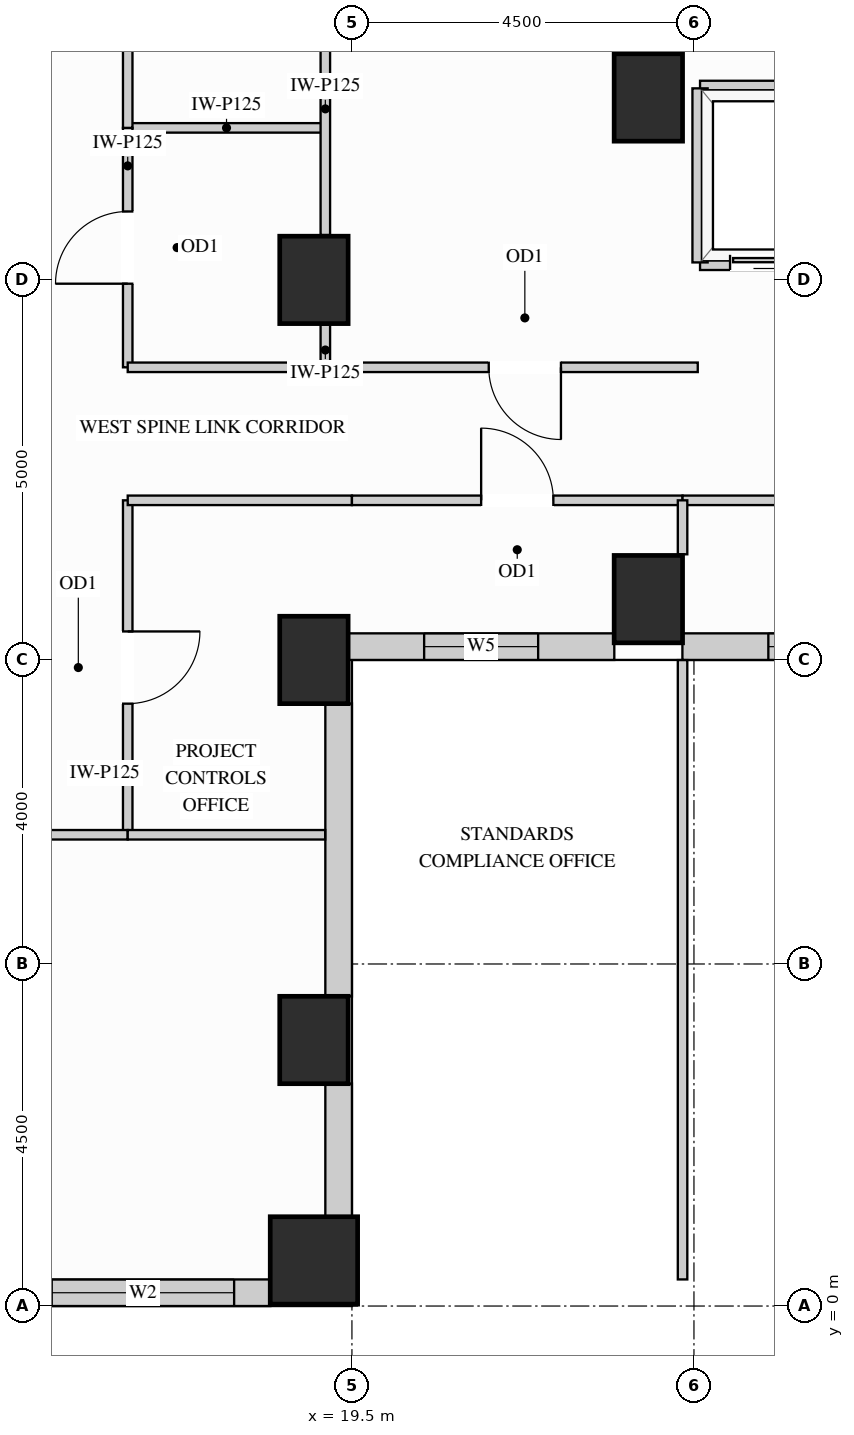
"""IFC4 building model, lengths in metres.
Left out: names, types, materials, properties, quantities, classifications, styles, units other than length and angle.
Written with IfcOpenShell. Run it as: python <this file> out.ifc"""

import sys

from ifc_helpers import new_model, si_unit, direction, frame, frame_2d, origin, origin_2d, place, context, subcontext, project, spatial, rectangle, extrude, source, transform, mapped, element, fill, save


model = new_model("IFC4")
c1 = context("Model", 3, precision=1e-05, world=origin(), true_north=direction((0.0, 1.0)))
c2 = subcontext(c1, "Body", "Model", "MODEL_VIEW")
j1 = project(units=[si_unit("LENGTHUNIT", "METRE"), si_unit("PLANEANGLEUNIT", "RADIAN")], contexts=[c1])
p1 = place(None, origin())
s1 = spatial("IfcSite", under=j1, at=p1, CompositionType="ELEMENT")
p2 = place(p1, origin())
s2 = spatial("IfcBuilding", under=s1, at=p2, CompositionType="ELEMENT")
p3 = place(p2, frame((0.0, 0.0, 135.0)))
s3 = spatial("IfcBuildingStorey", under=s2, at=p3, CompositionType="ELEMENT", Elevation=135.0)
m1 = source(origin(), c2, "Body", "SweptSolid", [
    extrude(rectangle(XDim=0.9, YDim=1.15, at=origin_2d()), origin(), (0.0, 0.0, 1.0), 3.32),
])
for number, where, z_axis, x_axis in (
    (1, (19.0, 13.5, 0.0), (0.0, 0.0, 1.0), (1.0, 0.0, 0.0)),
    (2, (19.0, 3.5, 0.0), (0.0, 0.0, 1.0), (1.0, 0.0, 0.0)),
    (3, (19.0, 8.5, 0.0), (0.0, 0.0, 1.0), (1.0, 0.0, 0.0)),
    (4, (23.4, 15.9, 0.0), (0.0, 0.0, 1.0), (1.0, 0.0, 0.0)),
    (5, (23.4, 9.3, 0.0), (0.0, 0.0, 1.0), (1.0, 0.0, 0.0)),
):
    element("IfcColumn", number, at=place(p3, frame(where, z_axis=z_axis, x_axis=x_axis)), inside=s3, PredefinedType="COLUMN", context=c2, shape_type="MappedRepresentation", body=[
        mapped(m1, transform((0.0, 0.0, 0.0), x_axis=(1.0, 0.0, 0.0), y_axis=(0.0, 1.0, 0.0), z_axis=(0.0, 0.0, 1.0))),
    ])
m2 = source(origin(), c2, "Body", "SweptSolid", [
    extrude(rectangle(XDim=1.15, YDim=1.15, at=origin_2d()), origin(), (0.0, 0.0, 1.0), 3.32),
])
p4 = place(p3, frame((19.0, 0.6, 0.0), z_axis=(0.0, 0.0, 1.0), x_axis=(1.0, 0.0, 0.0)))
e6 = element("IfcColumn", 6, at=p4, inside=s3, PredefinedType="COLUMN", context=c2, shape_type="MappedRepresentation", body=[
    mapped(m2, transform((0.0, 0.0, 0.0), x_axis=(1.0, 0.0, 0.0), y_axis=(0.0, 1.0, 0.0), z_axis=(0.0, 0.0, 1.0))),
])
p5 = place(p3, frame((15.073, 0.175, 0.0), z_axis=(0.0, 0.0, 1.0), x_axis=(1.0, 0.0, 0.0)))
e7 = element("IfcWall", 7, at=p5, inside=s3, PredefinedType="SOLIDWALL", context=c2, shape_type="SweptSolid", body=[
    extrude(rectangle(XDim=3.354, YDim=0.35, at=frame_2d((1.677, 0.0))), origin(), (0.0, 0.0, 1.0), 3.305),
])
p6 = place(p5, frame((0.477, 0.0, 0.78)))
e8 = element("IfcOpeningElement", 8, at=p6, cuts=e7, PredefinedType="OPENING", context=c2, shape_type="SweptSolid", body=[
    extrude(rectangle(XDim=2.4, YDim=2.1, at=frame_2d((1.2, 1.05))), frame((0.0, 0.185, 0.0), z_axis=(0.0, -1.0, 0.0), x_axis=(1.0, 0.0, 0.0)), (0.0, 0.0, 1.0), 0.37),
])
m3 = source(origin(), c2, "Body", "SweptSolid", [
    extrude(rectangle(XDim=1.754, YDim=0.35, at=frame_2d((0.877, 0.0))), origin(), (0.0, 0.0, 1.0), 2.459),
])
p7 = place(p3, frame((19.325, 1.173, 0.0), z_axis=(0.0, 0.0, 1.0), x_axis=(0.0, 1.0, 0.0)))
e9 = element("IfcWall", 9, at=p7, inside=s3, PredefinedType="SOLIDWALL", context=c2, shape_type="MappedRepresentation", body=[
    mapped(m3, transform((0.0, 0.0, 0.0), x_axis=(1.0, 0.0, 0.0), y_axis=(0.0, 1.0, 0.0), z_axis=(0.0, 0.0, 1.0))),
])
m4 = source(origin(), c2, "Body", "SweptSolid", [
    extrude(rectangle(XDim=3.854, YDim=0.35, at=frame_2d((1.927, 0.0))), origin(), (0.0, 0.0, 1.0), 2.459),
])
p8 = place(p3, frame((19.325, 4.073, 0.0), z_axis=(0.0, 0.0, 1.0), x_axis=(0.0, 1.0, 0.0)))
e10 = element("IfcWall", 10, at=p8, inside=s3, PredefinedType="SOLIDWALL", context=c2, shape_type="MappedRepresentation", body=[
    mapped(m4, transform((0.0, 0.0, 0.0), x_axis=(1.0, 0.0, 0.0), y_axis=(0.0, 1.0, 0.0), z_axis=(0.0, 0.0, 1.0))),
])
p9 = place(p3, frame((19.448, 8.675, 0.0), z_axis=(0.0, 0.0, 1.0), x_axis=(1.0, 0.0, 0.0)))
e11 = element("IfcWall", 11, at=p9, inside=s3, PredefinedType="SOLIDWALL", context=c2, shape_type="SweptSolid", body=[
    extrude(rectangle(XDim=3.504, YDim=0.35, at=frame_2d((1.752, 0.0))), origin(), (0.0, 0.0, 1.0), 3.305),
])
p10 = place(p9, frame((1.002, 0.0, 0.78)))
e12 = element("IfcOpeningElement", 12, at=p10, cuts=e11, PredefinedType="OPENING", context=c2, shape_type="SweptSolid", body=[
    extrude(rectangle(XDim=1.5, YDim=2.0, at=frame_2d((0.75, 1.0))), frame((0.0, 0.185, 0.0), z_axis=(0.0, -1.0, 0.0), x_axis=(1.0, 0.0, 0.0)), (0.0, 0.0, 1.0), 0.37),
])
p11 = place(p3, frame((23.848, 8.675, 0.0), z_axis=(0.0, 0.0, 1.0), x_axis=(1.0, 0.0, 0.0)))
e13 = element("IfcWall", 13, at=p11, inside=s3, PredefinedType="SOLIDWALL", context=c2, shape_type="SweptSolid", body=[
    extrude(rectangle(XDim=6.204, YDim=0.35, at=frame_2d((3.102, 0.0))), origin(), (0.0, 0.0, 1.0), 3.305),
])
p12 = place(p11, frame((1.131, 0.0, 0.78)))
e14 = element("IfcOpeningElement", 14, at=p12, cuts=e13, PredefinedType="OPENING", context=c2, shape_type="SweptSolid", body=[
    extrude(rectangle(XDim=1.5, YDim=2.0, at=frame_2d((0.75, 1.0))), frame((0.0, 0.185, 0.0), z_axis=(0.0, -1.0, 0.0), x_axis=(1.0, 0.0, 0.0)), (0.0, 0.0, 1.0), 0.37),
])
p13 = place(p11, frame((3.441, 0.0, 0.78)))
e15 = element("IfcOpeningElement", 15, at=p13, cuts=e13, PredefinedType="OPENING", context=c2, shape_type="SweptSolid", body=[
    extrude(rectangle(XDim=1.5, YDim=2.0, at=frame_2d((0.75, 1.0))), frame((0.0, 0.185, 0.0), z_axis=(0.0, -1.0, 0.0), x_axis=(1.0, 0.0, 0.0)), (0.0, 0.0, 1.0), 0.37),
])
m5 = source(origin(), c2, "Body", "SweptSolid", [
    extrude(rectangle(XDim=2.6, YDim=0.125, at=frame_2d((1.3, 0.0))), origin(), (0.0, 0.0, 1.0), 3.305),
])
p14 = place(p3, frame((16.55, 15.5, 0.0), z_axis=(0.0, 0.0, 1.0), x_axis=(1.0, 0.0, 0.0)))
e16 = element("IfcWall", 16, at=p14, inside=s3, PredefinedType="PARTITIONING", context=c2, shape_type="MappedRepresentation", body=[
    mapped(m5, transform((0.0, 0.0, 0.0), x_axis=(1.0, 0.0, 0.0), y_axis=(0.0, 1.0, 0.0), z_axis=(0.0, 0.0, 1.0))),
])
m6 = source(origin(), c2, "Body", "SweptSolid", [
    extrude(rectangle(XDim=0.56, YDim=0.125, at=frame_2d((0.28, 0.0))), origin(), (0.0, 0.0, 1.0), 2.617),
])
p15 = place(p3, frame((19.15, 12.35, 0.0), z_axis=(0.0, 0.0, 1.0), x_axis=(0.0, 1.0, 0.0)))
e17 = element("IfcWall", 17, at=p15, inside=s3, PredefinedType="PARTITIONING", context=c2, shape_type="MappedRepresentation", body=[
    mapped(m6, transform((0.0, 0.0, 0.0), x_axis=(1.0, 0.0, 0.0), y_axis=(0.0, 1.0, 0.0), z_axis=(0.0, 0.0, 1.0))),
])
m7 = source(origin(), c2, "Body", "SweptSolid", [
    extrude(rectangle(XDim=3.32, YDim=0.125, at=frame_2d((1.66, 0.0))), origin(), (0.0, 0.0, 1.0), 2.617),
])
p16 = place(p3, frame((19.15, 14.09, 0.0), z_axis=(0.0, 0.0, 1.0), x_axis=(0.0, 1.0, 0.0)))
e18 = element("IfcWall", 18, at=p16, inside=s3, PredefinedType="PARTITIONING", context=c2, shape_type="MappedRepresentation", body=[
    mapped(m7, transform((0.0, 0.0, 0.0), x_axis=(1.0, 0.0, 0.0), y_axis=(0.0, 1.0, 0.0), z_axis=(0.0, 0.0, 1.0))),
])
p17 = place(p3, frame((16.55, 12.35, 0.0), z_axis=(0.0, 0.0, 1.0), x_axis=(0.0, 1.0, 0.0)))
e19 = element("IfcWall", 19, at=p17, inside=s3, PredefinedType="PARTITIONING", context=c2, shape_type="SweptSolid", body=[
    extrude(rectangle(XDim=3.15, YDim=0.125, at=frame_2d((1.575, 0.0))), origin(), (0.0, 0.0, 1.0), 3.305),
])
p18 = place(p17, frame((1.1, 0.0, 0.0)))
e20 = element("IfcOpeningElement", 20, at=p18, cuts=e19, PredefinedType="OPENING", context=c2, shape_type="SweptSolid", body=[
    extrude(rectangle(XDim=0.95, YDim=2.15, at=frame_2d((0.475, 1.075))), frame((0.0, 0.073, 0.0), z_axis=(0.0, -1.0, 0.0), x_axis=(1.0, 0.0, 0.0)), (0.0, 0.0, 1.0), 0.145),
])
p19 = place(p3, frame((16.55, 15.5, 0.0), z_axis=(0.0, 0.0, 1.0), x_axis=(0.0, 1.0, 0.0)))
e21 = element("IfcWall", 21, at=p19, inside=s3, PredefinedType="PARTITIONING", context=c2, shape_type="SweptSolid", body=[
    extrude(rectangle(XDim=7.85, YDim=0.125, at=frame_2d((3.925, 0.0))), origin(), (0.0, 0.0, 1.0), 3.305),
])
p20 = place(p19, frame((3.45, 0.0, 0.0)))
e22 = element("IfcOpeningElement", 22, at=p20, cuts=e21, PredefinedType="OPENING", context=c2, shape_type="SweptSolid", body=[
    extrude(rectangle(XDim=0.95, YDim=2.15, at=frame_2d((0.475, 1.075))), frame((0.0, 0.073, 0.0), z_axis=(0.0, -1.0, 0.0), x_axis=(1.0, 0.0, 0.0)), (0.0, 0.0, 1.0), 0.145),
])
p21 = place(p3, frame((16.55, 6.2, 0.0), z_axis=(0.0, 0.0, 1.0), x_axis=(0.0, 1.0, 0.0)))
e23 = element("IfcWall", 23, at=p21, inside=s3, PredefinedType="PARTITIONING", context=c2, shape_type="SweptSolid", body=[
    extrude(rectangle(XDim=4.4, YDim=0.125, at=frame_2d((2.2, 0.0))), origin(), (0.0, 0.0, 1.0), 3.305),
])
p22 = place(p21, frame((1.725, 0.0, 0.0)))
e24 = element("IfcOpeningElement", 24, at=p22, cuts=e23, PredefinedType="OPENING", context=c2, shape_type="SweptSolid", body=[
    extrude(rectangle(XDim=0.95, YDim=2.15, at=frame_2d((0.475, 1.075))), frame((0.0, 0.073, 0.0), z_axis=(0.0, -1.0, 0.0), x_axis=(1.0, 0.0, 0.0)), (0.0, 0.0, 1.0), 0.145),
])
m8 = source(origin(), c2, "Body", "SweptSolid", [
    extrude(rectangle(XDim=2.95, YDim=0.125, at=frame_2d((1.475, 0.0))), origin(), (0.0, 0.0, 1.0), 3.305),
])
p23 = place(p3, frame((16.55, 12.35, 0.0), z_axis=(0.0, 0.0, 1.0), x_axis=(1.0, 0.0, 0.0)))
e25 = element("IfcWall", 25, at=p23, inside=s3, PredefinedType="PARTITIONING", context=c2, shape_type="MappedRepresentation", body=[
    mapped(m8, transform((0.0, 0.0, 0.0), x_axis=(1.0, 0.0, 0.0), y_axis=(0.0, 1.0, 0.0), z_axis=(0.0, 0.0, 1.0))),
])
p24 = place(p3, frame((19.5, 12.35, 0.0), z_axis=(0.0, 0.0, 1.0), x_axis=(1.0, 0.0, 0.0)))
e26 = element("IfcWall", 26, at=p24, inside=s3, PredefinedType="PARTITIONING", context=c2, shape_type="SweptSolid", body=[
    extrude(rectangle(XDim=4.55, YDim=0.125, at=frame_2d((2.275, 0.0))), origin(), (0.0, 0.0, 1.0), 3.305),
])
p25 = place(p24, frame((1.8, 0.0, 0.0)))
e27 = element("IfcOpeningElement", 27, at=p25, cuts=e26, PredefinedType="OPENING", context=c2, shape_type="SweptSolid", body=[
    extrude(rectangle(XDim=0.95, YDim=2.15, at=frame_2d((0.475, 1.075))), frame((0.0, 0.073, 0.0), z_axis=(0.0, -1.0, 0.0), x_axis=(1.0, 0.0, 0.0)), (0.0, 0.0, 1.0), 0.145),
])
p26 = place(p3, frame((16.55, 10.6, 0.0), z_axis=(0.0, 0.0, 1.0), x_axis=(1.0, 0.0, 0.0)))
e28 = element("IfcWall", 28, at=p26, inside=s3, PredefinedType="PARTITIONING", context=c2, shape_type="MappedRepresentation", body=[
    mapped(m8, transform((0.0, 0.0, 0.0), x_axis=(1.0, 0.0, 0.0), y_axis=(0.0, 1.0, 0.0), z_axis=(0.0, 0.0, 1.0))),
])
p27 = place(p3, frame((19.5, 10.6, 0.0), z_axis=(0.0, 0.0, 1.0), x_axis=(1.0, 0.0, 0.0)))
e29 = element("IfcWall", 29, at=p27, inside=s3, PredefinedType="PARTITIONING", context=c2, shape_type="SweptSolid", body=[
    extrude(rectangle(XDim=4.35, YDim=0.125, at=frame_2d((2.175, 0.0))), origin(), (0.0, 0.0, 1.0), 3.305),
])
p28 = place(p27, frame((1.7, 0.0, 0.0)))
e30 = element("IfcOpeningElement", 30, at=p28, cuts=e29, PredefinedType="OPENING", context=c2, shape_type="SweptSolid", body=[
    extrude(rectangle(XDim=0.95, YDim=2.15, at=frame_2d((0.475, 1.075))), frame((0.0, 0.073, 0.0), z_axis=(0.0, -1.0, 0.0), x_axis=(1.0, 0.0, 0.0)), (0.0, 0.0, 1.0), 0.145),
])
p29 = place(p3, frame((23.85, 10.6, 0.0), z_axis=(0.0, 0.0, 1.0), x_axis=(1.0, 0.0, 0.0)))
e31 = element("IfcWall", 31, at=p29, inside=s3, PredefinedType="PARTITIONING", context=c2, shape_type="SweptSolid", body=[
    extrude(rectangle(XDim=6.0, YDim=0.125, at=frame_2d((3.0, 0.0))), origin(), (0.0, 0.0, 1.0), 3.305),
])
p30 = place(p29, frame((2.525, 0.0, 0.0)))
e32 = element("IfcOpeningElement", 32, at=p30, cuts=e31, PredefinedType="OPENING", context=c2, shape_type="SweptSolid", body=[
    extrude(rectangle(XDim=0.95, YDim=2.15, at=frame_2d((0.475, 1.075))), frame((0.0, 0.073, 0.0), z_axis=(0.0, -1.0, 0.0), x_axis=(1.0, 0.0, 0.0)), (0.0, 0.0, 1.0), 0.145),
])
m9 = source(origin(), c2, "Body", "SweptSolid", [
    extrude(rectangle(XDim=8.148, YDim=0.125, at=frame_2d((4.074, 0.0))), origin(), (0.0, 0.0, 1.0), 3.305),
])
p31 = place(p3, frame((23.85, 0.35, 0.0), z_axis=(0.0, 0.0, 1.0), x_axis=(0.0, 1.0, 0.0)))
e33 = element("IfcWall", 33, at=p31, inside=s3, PredefinedType="PARTITIONING", context=c2, shape_type="MappedRepresentation", body=[
    mapped(m9, transform((0.0, 0.0, 0.0), x_axis=(1.0, 0.0, 0.0), y_axis=(0.0, 1.0, 0.0), z_axis=(0.0, 0.0, 1.0))),
])
m10 = source(origin(), c2, "Body", "SweptSolid", [
    extrude(rectangle(XDim=0.71, YDim=0.125, at=frame_2d((0.355, 0.0))), origin(), (0.0, 0.0, 1.0), 3.305),
])
p32 = place(p3, frame((23.85, 9.89, 0.0), z_axis=(0.0, 0.0, 1.0), x_axis=(0.0, 1.0, 0.0)))
e34 = element("IfcWall", 34, at=p32, inside=s3, PredefinedType="PARTITIONING", context=c2, shape_type="MappedRepresentation", body=[
    mapped(m10, transform((0.0, 0.0, 0.0), x_axis=(1.0, 0.0, 0.0), y_axis=(0.0, 1.0, 0.0), z_axis=(0.0, 0.0, 1.0))),
])
p33 = place(p3, frame((2.45, 6.2, 0.0), z_axis=(0.0, 0.0, 1.0), x_axis=(1.0, 0.0, 0.0)))
e35 = element("IfcWall", 35, at=p33, inside=s3, PredefinedType="PARTITIONING", context=c2, shape_type="SweptSolid", body=[
    extrude(rectangle(XDim=14.1, YDim=0.125, at=frame_2d((7.05, 0.0))), origin(), (0.0, 0.0, 1.0), 2.768),
])
p34 = place(p33, frame((6.575, 0.0, 0.0)))
e36 = element("IfcOpeningElement", 36, at=p34, cuts=e35, PredefinedType="OPENING", context=c2, shape_type="SweptSolid", body=[
    extrude(rectangle(XDim=0.95, YDim=2.15, at=frame_2d((0.475, 1.075))), frame((0.0, 0.073, 0.0), z_axis=(0.0, -1.0, 0.0), x_axis=(1.0, 0.0, 0.0)), (0.0, 0.0, 1.0), 0.145),
])
m11 = source(origin(), c2, "Body", "SweptSolid", [
    extrude(rectangle(XDim=2.598, YDim=0.125, at=frame_2d((1.299, 0.0))), origin(), (0.0, 0.0, 1.0), 2.768),
])
p35 = place(p3, frame((16.55, 6.2, 0.0), z_axis=(0.0, 0.0, 1.0), x_axis=(1.0, 0.0, 0.0)))
e37 = element("IfcWall", 37, at=p35, inside=s3, PredefinedType="PARTITIONING", context=c2, shape_type="MappedRepresentation", body=[
    mapped(m11, transform((0.0, 0.0, 0.0), x_axis=(1.0, 0.0, 0.0), y_axis=(0.0, 1.0, 0.0), z_axis=(0.0, 0.0, 1.0))),
])
m12 = source(origin(), c2, "Body", "SweptSolid", [
    extrude(rectangle(XDim=1.89, YDim=0.2, at=frame_2d((0.945, 0.0))), origin(), (0.0, 0.0, 1.0), 2.617),
])
p36 = place(p3, frame((24.08, 16.02, 0.0), z_axis=(0.0, 0.0, 1.0), x_axis=(1.0, 0.0, 0.0)))
e38 = element("IfcWall", 38, at=p36, inside=s3, PredefinedType="PARTITIONING", context=c2, shape_type="MappedRepresentation", body=[
    mapped(m12, transform((0.0, 0.0, 0.0), x_axis=(1.0, 0.0, 0.0), y_axis=(0.0, 1.0, 0.0), z_axis=(0.0, 0.0, 1.0))),
])
p37 = place(p3, frame((24.08, 13.73, 0.0), z_axis=(0.0, 0.0, 1.0), x_axis=(1.0, 0.0, 0.0)))
e39 = element("IfcWall", 39, at=p37, inside=s3, PredefinedType="PARTITIONING", context=c2, shape_type="SweptSolid", body=[
    extrude(rectangle(XDim=1.89, YDim=0.2, at=frame_2d((0.945, 0.0))), origin(), (0.0, 0.0, 1.0), 2.386),
])
p38 = place(p37, frame((0.395, 0.0, 0.0)))
e40 = element("IfcOpeningElement", 40, at=p38, cuts=e39, PredefinedType="OPENING", context=c2, shape_type="SweptSolid", body=[
    extrude(rectangle(XDim=1.1, YDim=2.2, at=frame_2d((0.55, 1.1))), frame((0.0, 0.11, 0.0), z_axis=(0.0, -1.0, 0.0), x_axis=(1.0, 0.0, 0.0)), (0.0, 0.0, 1.0), 0.22),
])
m13 = source(origin(), c2, "Body", "SweptSolid", [
    extrude(rectangle(XDim=2.29, YDim=0.2, at=frame_2d((1.145, 0.0))), origin(), (0.0, 0.0, 1.0), 3.305),
])
p39 = place(p3, frame((24.08, 13.73, 0.0), z_axis=(0.0, 0.0, 1.0), x_axis=(0.0, 1.0, 0.0)))
e41 = element("IfcWall", 41, at=p39, inside=s3, PredefinedType="PARTITIONING", context=c2, shape_type="MappedRepresentation", body=[
    mapped(m13, transform((0.0, 0.0, 0.0), x_axis=(1.0, 0.0, 0.0), y_axis=(0.0, 1.0, 0.0), z_axis=(0.0, 0.0, 1.0))),
])
m14 = source(origin(), c2, "Body", "SweptSolid", [
    extrude(rectangle(XDim=1.1, YDim=2.2, at=frame_2d((0.55, 1.1))), frame((0.0, 0.025, 0.0), z_axis=(0.0, -1.0, 0.0), x_axis=(1.0, 0.0, 0.0)), (0.0, 0.0, 1.0), 0.05),
])
p40 = place(p38, origin())
e42 = element("IfcDoor", 42, at=p40, inside=s3, OperationType="SLIDING_TO_LEFT", PredefinedType="DOOR", context=c2, shape_type="MappedRepresentation", body=[
    mapped(m14, transform((0.0, 0.0, 0.0), x_axis=(1.0, 0.0, 0.0), y_axis=(0.0, 1.0, 0.0), z_axis=(0.0, 0.0, 1.0))),
])
fill(e40, e42)
m15 = source(origin(), c2, "Body", "SweptSolid", [
    extrude(rectangle(XDim=0.95, YDim=2.15, at=frame_2d((0.475, 1.075))), frame((0.0, 0.025, 0.0), z_axis=(0.0, -1.0, 0.0), x_axis=(1.0, 0.0, 0.0)), (0.0, 0.0, 1.0), 0.05),
])
p41 = place(p22, origin())
e43 = element("IfcDoor", 43, at=p41, inside=s3, OperationType="SINGLE_SWING_RIGHT", PredefinedType="DOOR", context=c2, shape_type="MappedRepresentation", body=[
    mapped(m15, transform((0.0, 0.0, 0.0), x_axis=(1.0, 0.0, 0.0), y_axis=(0.0, 1.0, 0.0), z_axis=(0.0, 0.0, 1.0))),
])
fill(e24, e43)
p42 = place(p18, origin())
e44 = element("IfcDoor", 44, at=p42, inside=s3, OperationType="SINGLE_SWING_LEFT", PredefinedType="DOOR", context=c2, shape_type="MappedRepresentation", body=[
    mapped(m15, transform((0.0, 0.0, 0.0), x_axis=(1.0, 0.0, 0.0), y_axis=(0.0, 1.0, 0.0), z_axis=(0.0, 0.0, 1.0))),
])
fill(e20, e44)
p43 = place(p25, origin())
e45 = element("IfcDoor", 45, at=p43, inside=s3, OperationType="SINGLE_SWING_RIGHT", PredefinedType="DOOR", context=c2, shape_type="MappedRepresentation", body=[
    mapped(m15, transform((0.0, 0.0, 0.0), x_axis=(1.0, 0.0, 0.0), y_axis=(0.0, 1.0, 0.0), z_axis=(0.0, 0.0, 1.0))),
])
fill(e27, e45)
p44 = place(p28, origin())
e46 = element("IfcDoor", 46, at=p44, inside=s3, OperationType="SINGLE_SWING_LEFT", PredefinedType="DOOR", context=c2, shape_type="MappedRepresentation", body=[
    mapped(m15, transform((0.0, 0.0, 0.0), x_axis=(1.0, 0.0, 0.0), y_axis=(0.0, 1.0, 0.0), z_axis=(0.0, 0.0, 1.0))),
])
fill(e30, e46)
m16 = source(origin(), c2, "Body", "SweptSolid", [
    extrude(rectangle(XDim=2.4, YDim=2.1, at=frame_2d((1.2, 1.05))), frame((0.0, 0.03, 0.0), z_axis=(0.0, -1.0, 0.0), x_axis=(1.0, 0.0, 0.0)), (0.0, 0.0, 1.0), 0.06),
])
p45 = place(p6, origin())
e47 = element("IfcWindow", 47, at=p45, inside=s3, PartitioningType="SINGLE_PANEL", PredefinedType="WINDOW", context=c2, shape_type="MappedRepresentation", body=[
    mapped(m16, transform((0.0, 0.0, 0.0), x_axis=(1.0, 0.0, 0.0), y_axis=(0.0, 1.0, 0.0), z_axis=(0.0, 0.0, 1.0))),
])
fill(e8, e47)
m17 = source(origin(), c2, "Body", "SweptSolid", [
    extrude(rectangle(XDim=1.5, YDim=2.0, at=frame_2d((0.75, 1.0))), frame((0.0, 0.03, 0.0), z_axis=(0.0, -1.0, 0.0), x_axis=(1.0, 0.0, 0.0)), (0.0, 0.0, 1.0), 0.06),
])
p46 = place(p10, origin())
e48 = element("IfcWindow", 48, at=p46, inside=s3, PartitioningType="SINGLE_PANEL", PredefinedType="WINDOW", context=c2, shape_type="MappedRepresentation", body=[
    mapped(m17, transform((0.0, 0.0, 0.0), x_axis=(1.0, 0.0, 0.0), y_axis=(0.0, 1.0, 0.0), z_axis=(0.0, 0.0, 1.0))),
])
fill(e12, e48)
p47 = place(p12, origin())
e49 = element("IfcWindow", 49, at=p47, inside=s3, PartitioningType="SINGLE_PANEL", PredefinedType="WINDOW", context=c2, shape_type="MappedRepresentation", body=[
    mapped(m17, transform((0.0, 0.0, 0.0), x_axis=(1.0, 0.0, 0.0), y_axis=(0.0, 1.0, 0.0), z_axis=(0.0, 0.0, 1.0))),
])
fill(e14, e49)
save(model, sys.argv[1])
